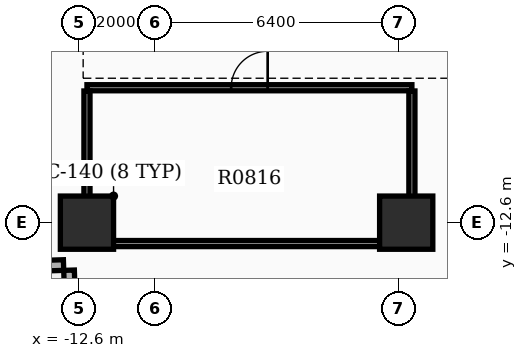
"""IFC4 building model, lengths in metres.
Left out: names, types, materials, properties, quantities, classifications, styles, units other than length and angle.
Written with IfcOpenShell. Run it as: python <this file> out.ifc"""

import sys

from ifc_helpers import new_model, si_unit, direction, frame, frame_2d, origin, origin_2d, place, context, subcontext, project, spatial, rectangle, extrude, element, fill, save


model = new_model("IFC4")
c1 = context("Model", 3, precision=1e-05, world=origin(), true_north=direction((0.0, 1.0)))
c2 = subcontext(c1, "Body", "Model", "MODEL_VIEW")
j1 = project(units=[si_unit("LENGTHUNIT", "METRE"), si_unit("PLANEANGLEUNIT", "RADIAN")], contexts=[c1])
p1 = place(None, origin())
s1 = spatial("IfcSite", under=j1, at=p1, CompositionType="ELEMENT")
p2 = place(p1, origin())
s2 = spatial("IfcBuilding", under=s1, at=p2, CompositionType="ELEMENT")
p3 = place(p2, frame((0.0, 0.0, 56.1)))
s3 = spatial("IfcBuildingStorey", under=s2, at=p3, CompositionType="ELEMENT", Elevation=56.1)
for number, where, z_axis, x_axis in (
    (1, (-12.4, -12.6, 0.0), (0.0, 0.0, 1.0), (1.0, 0.0, 0.0)),
    (2, (-4.0, -12.6, 0.0), (0.0, 0.0, 1.0), (1.0, 0.0, 0.0)),
):
    element("IfcColumn", number, at=place(p3, frame(where, z_axis=z_axis, x_axis=x_axis)), inside=s3, PredefinedType="COLUMN", context=c2, shape_type="SweptSolid", body=[
        extrude(rectangle(XDim=1.4, YDim=1.4, at=origin_2d()), origin(), (0.0, 0.0, 1.0), 3.9),
    ])
p4 = place(p3, frame((-14.235, -13.754, 0.0), z_axis=(0.0, 0.0, 1.0), x_axis=(0.999506398264, 0.031415916822, 0.0)))
e3 = element("IfcWall", 3, at=p4, inside=s3, PredefinedType="STANDARD", context=c2, shape_type="SweptSolid", body=[
    extrude(rectangle(XDim=1.22, YDim=0.28, at=frame_2d((0.61, 0.0))), origin(), (0.0, 0.0, 1.0), 2.91),
])
p5 = place(p3, frame((-12.871, -13.851, 0.0), z_axis=(0.0, 0.0, 1.0), x_axis=(0.031412596484, -0.999506502621, 0.0)))
e4 = element("IfcWall", 4, at=p5, inside=s3, PredefinedType="STANDARD", context=c2, shape_type="SweptSolid", body=[
    extrude(rectangle(XDim=1.5, YDim=0.28, at=frame_2d((0.75, 0.0))), origin(), (0.0, 0.0, 1.0), 2.91),
])
p6 = place(p3, frame((-12.4, -13.15, 0.0), z_axis=(0.0, 0.0, 1.0), x_axis=(1.0, 0.0, 0.0)))
e5 = element("IfcWall", 5, at=p6, inside=s3, PredefinedType="PARTITIONING", context=c2, shape_type="SweptSolid", body=[
    extrude(rectangle(XDim=8.55, YDim=0.16, at=frame_2d((4.275, 0.0))), origin(), (0.0, 0.0, 1.0), 2.9),
])
p7 = place(p3, frame((-12.4, -9.05, 0.0), z_axis=(0.0, 0.0, 1.0), x_axis=(1.0, 0.0, 0.0)))
e6 = element("IfcWall", 6, at=p7, inside=s3, PredefinedType="PARTITIONING", context=c2, shape_type="SweptSolid", body=[
    extrude(rectangle(XDim=8.55, YDim=0.16, at=frame_2d((4.275, 0.0))), origin(), (0.0, 0.0, 1.0), 2.9),
])
p8 = place(p7, frame((3.795, 0.0, 0.0)))
e7 = element("IfcOpeningElement", 7, at=p8, cuts=e6, PredefinedType="OPENING", context=c2, shape_type="SweptSolid", body=[
    extrude(rectangle(XDim=0.96, YDim=2.15, at=frame_2d((0.48, 1.075))), frame((0.0, 0.09, 0.0), z_axis=(0.0, -1.0, 0.0), x_axis=(1.0, 0.0, 0.0)), (0.0, 0.0, 1.0), 0.18),
])
for number, where, z_axis, x_axis in (
    (8, (-12.4, -13.065, 0.0), (0.0, 0.0, 1.0), (0.0, 1.0, 0.0)),
    (9, (-3.85, -13.065, 0.0), (0.0, 0.0, 1.0), (0.0, 1.0, 0.0)),
):
    element("IfcWall", number, at=place(p3, frame(where, z_axis=z_axis, x_axis=x_axis)), inside=s3, PredefinedType="PARTITIONING", context=c2, shape_type="SweptSolid", body=[
        extrude(rectangle(XDim=3.93, YDim=0.16, at=frame_2d((1.965, 0.0))), origin(), (0.0, 0.0, 1.0), 2.9),
    ])
p9 = place(p8, origin())
e10 = element("IfcDoor", 10, at=p9, inside=s3, OperationType="SINGLE_SWING_RIGHT", PredefinedType="DOOR", context=c2, shape_type="SweptSolid", body=[
    extrude(rectangle(XDim=0.96, YDim=2.15, at=frame_2d((0.48, 1.075))), frame((0.0, 0.025, 0.0), z_axis=(0.0, -1.0, 0.0), x_axis=(1.0, 0.0, 0.0)), (0.0, 0.0, 1.0), 0.05),
])
fill(e7, e10)
save(model, sys.argv[1])
